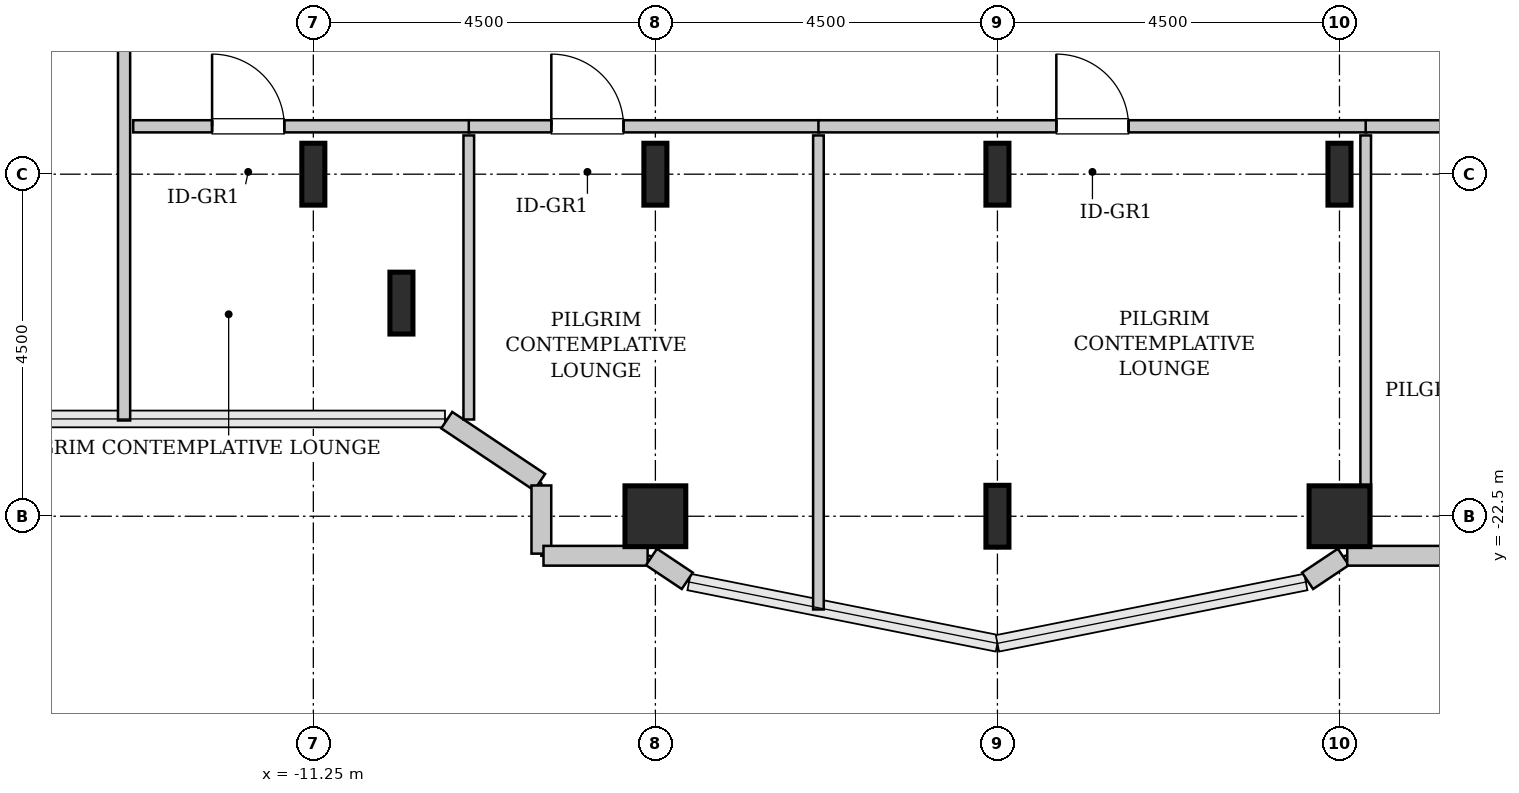
"""IFC4 building model, lengths in metres.
Left out: names, types, materials, properties, quantities, classifications, styles, units other than length and angle.
Written with IfcOpenShell. Run it as: python <this file> out.ifc"""

import sys

from ifc_helpers import new_model, si_unit, direction, frame, frame_2d, origin, origin_2d, place, context, subcontext, project, spatial, rectangle, hollow_rectangle, i_section, extrude, source, transform, mapped, element, fill, save


model = new_model("IFC4")
c1 = context("Model", 3, precision=1e-05, world=origin(), true_north=direction((0.0, 1.0)))
c2 = subcontext(c1, "Body", "Model", "MODEL_VIEW")
j1 = project(units=[si_unit("LENGTHUNIT", "METRE"), si_unit("PLANEANGLEUNIT", "RADIAN")], contexts=[c1])
p1 = place(None, origin())
s1 = spatial("IfcSite", under=j1, at=p1, CompositionType="ELEMENT")
p2 = place(p1, origin())
s2 = spatial("IfcBuilding", under=s1, at=p2, CompositionType="ELEMENT")
p3 = place(p2, frame((0.0, 0.0, 152.6)))
s3 = spatial("IfcBuildingStorey", under=s2, at=p3, CompositionType="ELEMENT", Elevation=152.6)
m1 = source(origin(), c2, "Body", "SweptSolid", [
    extrude(i_section(OverallWidth=0.303, OverallDepth=0.814, WebThickness=0.021, FlangeThickness=0.04, FilletRadius=0.03, at=origin_2d()), origin(), (0.0, 0.0, 1.0), 3.8),
])
for number, where, z_axis, x_axis in (
    (1, (-11.25, -18.0, 0.0), (0.0, 0.0, 1.0), (1.0, 0.0, 0.0)),
    (2, (-10.091, -19.696, 0.0), (0.0, 0.0, 1.0), (1.0, 0.0, 0.0)),
):
    element("IfcColumn", number, at=place(p3, frame(where, z_axis=z_axis, x_axis=x_axis)), inside=s3, PredefinedType="COLUMN", context=c2, shape_type="MappedRepresentation", body=[
        mapped(m1, transform((0.0, 0.0, 0.0), x_axis=(1.0, 0.0, 0.0), y_axis=(0.0, 1.0, 0.0), z_axis=(0.0, 0.0, 1.0), scale=1.0)),
    ])
m2 = source(origin(), c2, "Body", "SweptSolid", [
    extrude(hollow_rectangle(XDim=0.8, YDim=0.8, WallThickness=0.04, InnerFilletRadius=0.04, OuterFilletRadius=0.08, at=origin_2d()), origin(), (0.0, 0.0, 1.0), 3.8),
])
p4 = place(p3, frame((-6.75, -22.5, 0.0), z_axis=(0.0, 0.0, 1.0), x_axis=(1.0, 0.0, 0.0)))
e3 = element("IfcColumn", 3, at=p4, inside=s3, PredefinedType="COLUMN", context=c2, shape_type="MappedRepresentation", body=[
    mapped(m2, transform((0.0, 0.0, 0.0), x_axis=(1.0, 0.0, 0.0), y_axis=(0.0, 1.0, 0.0), z_axis=(0.0, 0.0, 1.0), scale=1.0)),
])
for number, where, z_axis, x_axis in (
    (4, (-6.75, -18.0, 0.0), (0.0, 0.0, 1.0), (1.0, 0.0, 0.0)),
    (5, (-2.25, -22.5, 0.0), (0.0, 0.0, 1.0), (1.0, 0.0, 0.0)),
    (6, (-2.25, -18.0, 0.0), (0.0, 0.0, 1.0), (1.0, 0.0, 0.0)),
):
    element("IfcColumn", number, at=place(p3, frame(where, z_axis=z_axis, x_axis=x_axis)), inside=s3, PredefinedType="COLUMN", context=c2, shape_type="MappedRepresentation", body=[
        mapped(m1, transform((0.0, 0.0, 0.0), x_axis=(1.0, 0.0, 0.0), y_axis=(0.0, 1.0, 0.0), z_axis=(0.0, 0.0, 1.0), scale=1.0)),
    ])
p5 = place(p3, frame((2.25, -22.5, 0.0), z_axis=(0.0, 0.0, 1.0), x_axis=(1.0, 0.0, 0.0)))
e7 = element("IfcColumn", 7, at=p5, inside=s3, PredefinedType="COLUMN", context=c2, shape_type="MappedRepresentation", body=[
    mapped(m2, transform((0.0, 0.0, 0.0), x_axis=(1.0, 0.0, 0.0), y_axis=(0.0, 1.0, 0.0), z_axis=(0.0, 0.0, 1.0), scale=1.0)),
])
p6 = place(p3, frame((2.25, -18.0, 0.0), z_axis=(0.0, 0.0, 1.0), x_axis=(1.0, 0.0, 0.0)))
e8 = element("IfcColumn", 8, at=p6, inside=s3, PredefinedType="COLUMN", context=c2, shape_type="MappedRepresentation", body=[
    mapped(m1, transform((0.0, 0.0, 0.0), x_axis=(1.0, 0.0, 0.0), y_axis=(0.0, 1.0, 0.0), z_axis=(0.0, 0.0, 1.0), scale=1.0)),
])
m3 = source(origin(), c2, "Body", "SweptSolid", [
    extrude(rectangle(XDim=1.469, YDim=0.26, at=frame_2d((0.734, 0.0))), origin(), (0.0, 0.0, 1.0), 3.55),
])
p7 = place(p3, frame((-9.495, -21.236, 0.0), z_axis=(0.0, 0.0, 1.0), x_axis=(0.831461760506, -0.555581983884, 0.0)))
e9 = element("IfcWall", 9, at=p7, inside=s3, PredefinedType="SOLIDWALL", context=c2, shape_type="MappedRepresentation", body=[
    mapped(m3, transform((0.0, 0.0, 0.0), x_axis=(1.0, 0.0, 0.0), y_axis=(0.0, 1.0, 0.0), z_axis=(0.0, 0.0, 1.0), scale=1.0)),
])
m4 = source(origin(), c2, "Body", "SweptSolid", [
    extrude(rectangle(XDim=0.897, YDim=0.26, at=frame_2d((0.448, 0.0))), origin(), (0.0, 0.0, 1.0), 3.55),
])
p8 = place(p3, frame((-8.25, -22.095, 0.0), z_axis=(0.0, 0.0, 1.0), x_axis=(0.0, -1.0, 0.0)))
e10 = element("IfcWall", 10, at=p8, inside=s3, PredefinedType="SOLIDWALL", context=c2, shape_type="MappedRepresentation", body=[
    mapped(m4, transform((0.0, 0.0, 0.0), x_axis=(1.0, 0.0, 0.0), y_axis=(0.0, 1.0, 0.0), z_axis=(0.0, 0.0, 1.0), scale=1.0)),
])
m5 = source(origin(), c2, "Body", "SweptSolid", [
    extrude(rectangle(XDim=1.37, YDim=0.26, at=frame_2d((0.685, 0.0))), origin(), (0.0, 0.0, 1.0), 3.55),
])
p9 = place(p3, frame((-8.222, -23.02, 0.0), z_axis=(0.0, 0.0, 1.0), x_axis=(1.0, 0.0, 0.0)))
e11 = element("IfcWall", 11, at=p9, inside=s3, PredefinedType="SOLIDWALL", context=c2, shape_type="MappedRepresentation", body=[
    mapped(m5, transform((0.0, 0.0, 0.0), x_axis=(1.0, 0.0, 0.0), y_axis=(0.0, 1.0, 0.0), z_axis=(0.0, 0.0, 1.0), scale=1.0)),
])
m6 = source(origin(), c2, "Body", "SweptSolid", [
    extrude(rectangle(XDim=0.565, YDim=0.26, at=frame_2d((0.283, 0.0))), origin(), (0.0, 0.0, 1.0), 3.55),
])
for number, where, z_axis, x_axis in (
    (12, (-6.801, -23.036, 0.0), (0.0, 0.0, 1.0), (0.832, -0.555, 0.0)),
    (13, (1.831, -23.35, 0.0), (0.0, 0.0, 1.0), (0.832, 0.555, 0.0)),
):
    element("IfcWall", number, at=place(p3, frame(where, z_axis=z_axis, x_axis=x_axis)), inside=s3, PredefinedType="SOLIDWALL", context=c2, shape_type="MappedRepresentation", body=[
        mapped(m6, transform((0.0, 0.0, 0.0), x_axis=(1.0, 0.0, 0.0), y_axis=(0.0, 1.0, 0.0), z_axis=(0.0, 0.0, 1.0), scale=1.0)),
    ])
p10 = place(p3, frame((2.352, -23.02, 0.0), z_axis=(0.0, 0.0, 1.0), x_axis=(1.0, 0.0, 0.0)))
e14 = element("IfcWall", 14, at=p10, inside=s3, PredefinedType="SOLIDWALL", context=c2, shape_type="MappedRepresentation", body=[
    mapped(m5, transform((0.0, 0.0, 0.0), x_axis=(1.0, 0.0, 0.0), y_axis=(0.0, 1.0, 0.0), z_axis=(0.0, 0.0, 1.0), scale=1.0)),
])
m7 = source(origin(), c2, "Body", "SweptSolid", [
    extrude(rectangle(XDim=13.045, YDim=0.16, at=frame_2d((6.522, 0.0))), origin(), (0.0, 0.0, 1.0), 3.535),
])
p11 = place(p3, frame((-13.74, -21.24, 0.0), z_axis=(0.0, 0.0, 1.0), x_axis=(0.0, 1.0, 0.0)))
e15 = element("IfcWall", 15, at=p11, inside=s3, PredefinedType="PARTITIONING", context=c2, shape_type="MappedRepresentation", body=[
    mapped(m7, transform((0.0, 0.0, 0.0), x_axis=(1.0, 0.0, 0.0), y_axis=(0.0, 1.0, 0.0), z_axis=(0.0, 0.0, 1.0), scale=1.0)),
])
p12 = place(p11, frame((7.962, 0.0, 0.0)))
e16 = element("IfcOpeningElement", 16, at=p12, cuts=e15, PredefinedType="OPENING", context=c2, shape_type="SweptSolid", body=[
    extrude(rectangle(XDim=0.95, YDim=2.1, at=frame_2d((0.475, 1.05))), frame((0.0, 0.09, 0.0), z_axis=(0.0, -1.0, 0.0), x_axis=(1.0, 0.0, 0.0)), (0.0, 0.0, 1.0), 0.18),
])
m8 = source(origin(), c2, "Body", "SweptSolid", [
    extrude(rectangle(XDim=4.425, YDim=0.16, at=frame_2d((2.212, 0.0))), origin(), (0.0, 0.0, 1.0), 3.535),
])
p13 = place(p3, frame((-13.62, -17.37, 0.0), z_axis=(0.0, 0.0, 1.0), x_axis=(1.0, 0.0, 0.0)))
e17 = element("IfcWall", 17, at=p13, inside=s3, PredefinedType="PARTITIONING", context=c2, shape_type="MappedRepresentation", body=[
    mapped(m8, transform((0.0, 0.0, 0.0), x_axis=(1.0, 0.0, 0.0), y_axis=(0.0, 1.0, 0.0), z_axis=(0.0, 0.0, 1.0), scale=1.0)),
])
p14 = place(p13, frame((1.038, 0.0, 0.0)))
e18 = element("IfcOpeningElement", 18, at=p14, cuts=e17, PredefinedType="OPENING", context=c2, shape_type="SweptSolid", body=[
    extrude(rectangle(XDim=0.95, YDim=2.1, at=frame_2d((0.475, 1.05))), frame((0.0, 0.09, 0.0), z_axis=(0.0, -1.0, 0.0), x_axis=(1.0, 0.0, 0.0)), (0.0, 0.0, 1.0), 0.18),
])
m9 = source(origin(), c2, "Body", "SweptSolid", [
    extrude(rectangle(XDim=3.737, YDim=0.14, at=frame_2d((1.869, 0.0))), origin(), (0.0, 0.0, 1.0), 3.535),
])
p15 = place(p3, frame((-9.205, -21.227, 0.0), z_axis=(0.0, 0.0, 1.0), x_axis=(0.0, 1.0, 0.0)))
e19 = element("IfcWall", 19, at=p15, inside=s3, PredefinedType="PARTITIONING", context=c2, shape_type="MappedRepresentation", body=[
    mapped(m9, transform((0.0, 0.0, 0.0), x_axis=(1.0, 0.0, 0.0), y_axis=(0.0, 1.0, 0.0), z_axis=(0.0, 0.0, 1.0), scale=1.0)),
])
m10 = source(origin(), c2, "Body", "SweptSolid", [
    extrude(rectangle(XDim=4.61, YDim=0.16, at=frame_2d((2.305, 0.0))), origin(), (0.0, 0.0, 1.0), 3.535),
])
p16 = place(p3, frame((-9.205, -17.37, 0.0), z_axis=(0.0, 0.0, 1.0), x_axis=(1.0, 0.0, 0.0)))
e20 = element("IfcWall", 20, at=p16, inside=s3, PredefinedType="PARTITIONING", context=c2, shape_type="MappedRepresentation", body=[
    mapped(m10, transform((0.0, 0.0, 0.0), x_axis=(1.0, 0.0, 0.0), y_axis=(0.0, 1.0, 0.0), z_axis=(0.0, 0.0, 1.0), scale=1.0)),
])
p17 = place(p16, frame((1.086, 0.0, 0.0)))
e21 = element("IfcOpeningElement", 21, at=p17, cuts=e20, PredefinedType="OPENING", context=c2, shape_type="SweptSolid", body=[
    extrude(rectangle(XDim=0.95, YDim=2.1, at=frame_2d((0.475, 1.05))), frame((0.0, 0.09, 0.0), z_axis=(0.0, -1.0, 0.0), x_axis=(1.0, 0.0, 0.0)), (0.0, 0.0, 1.0), 0.18),
])
m11 = source(origin(), c2, "Body", "SweptSolid", [
    extrude(rectangle(XDim=6.236, YDim=0.14, at=frame_2d((3.118, 0.0))), origin(), (0.0, 0.0, 1.0), 3.535),
])
p18 = place(p3, frame((-4.605, -23.726, 0.0), z_axis=(0.0, 0.0, 1.0), x_axis=(0.0, 1.0, 0.0)))
e22 = element("IfcWall", 22, at=p18, inside=s3, PredefinedType="PARTITIONING", context=c2, shape_type="MappedRepresentation", body=[
    mapped(m11, transform((0.0, 0.0, 0.0), x_axis=(1.0, 0.0, 0.0), y_axis=(0.0, 1.0, 0.0), z_axis=(0.0, 0.0, 1.0), scale=1.0)),
])
m12 = source(origin(), c2, "Body", "SweptSolid", [
    extrude(rectangle(XDim=7.21, YDim=0.16, at=frame_2d((3.605, 0.0))), origin(), (0.0, 0.0, 1.0), 3.535),
])
p19 = place(p3, frame((-4.605, -17.37, 0.0), z_axis=(0.0, 0.0, 1.0), x_axis=(1.0, 0.0, 0.0)))
e23 = element("IfcWall", 23, at=p19, inside=s3, PredefinedType="PARTITIONING", context=c2, shape_type="MappedRepresentation", body=[
    mapped(m12, transform((0.0, 0.0, 0.0), x_axis=(1.0, 0.0, 0.0), y_axis=(0.0, 1.0, 0.0), z_axis=(0.0, 0.0, 1.0), scale=1.0)),
])
p20 = place(p19, frame((3.13, 0.0, 0.0)))
e24 = element("IfcOpeningElement", 24, at=p20, cuts=e23, PredefinedType="OPENING", context=c2, shape_type="SweptSolid", body=[
    extrude(rectangle(XDim=0.95, YDim=2.1, at=frame_2d((0.475, 1.05))), frame((0.0, 0.09, 0.0), z_axis=(0.0, -1.0, 0.0), x_axis=(1.0, 0.0, 0.0)), (0.0, 0.0, 1.0), 0.18),
])
m13 = source(origin(), c2, "Body", "SweptSolid", [
    extrude(rectangle(XDim=5.36, YDim=0.14, at=frame_2d((2.68, 0.0))), origin(), (0.0, 0.0, 1.0), 2.875),
])
p21 = place(p3, frame((2.595, -22.85, 0.0), z_axis=(0.0, 0.0, 1.0), x_axis=(0.0, 1.0, 0.0)))
e25 = element("IfcWall", 25, at=p21, inside=s3, PredefinedType="PARTITIONING", context=c2, shape_type="MappedRepresentation", body=[
    mapped(m13, transform((0.0, 0.0, 0.0), x_axis=(1.0, 0.0, 0.0), y_axis=(0.0, 1.0, 0.0), z_axis=(0.0, 0.0, 1.0), scale=1.0)),
])
m14 = source(origin(), c2, "Body", "SweptSolid", [
    extrude(rectangle(XDim=5.81, YDim=0.16, at=frame_2d((2.905, 0.0))), origin(), (0.0, 0.0, 1.0), 3.535),
])
p22 = place(p3, frame((2.595, -17.37, 0.0), z_axis=(0.0, 0.0, 1.0), x_axis=(1.0, 0.0, 0.0)))
e26 = element("IfcWall", 26, at=p22, inside=s3, PredefinedType="PARTITIONING", context=c2, shape_type="MappedRepresentation", body=[
    mapped(m14, transform((0.0, 0.0, 0.0), x_axis=(1.0, 0.0, 0.0), y_axis=(0.0, 1.0, 0.0), z_axis=(0.0, 0.0, 1.0), scale=1.0)),
])
p23 = place(p22, frame((2.43, 0.0, 0.0)))
e27 = element("IfcOpeningElement", 27, at=p23, cuts=e26, PredefinedType="OPENING", context=c2, shape_type="SweptSolid", body=[
    extrude(rectangle(XDim=0.95, YDim=2.1, at=frame_2d((0.475, 1.05))), frame((0.0, 0.09, 0.0), z_axis=(0.0, -1.0, 0.0), x_axis=(1.0, 0.0, 0.0)), (0.0, 0.0, 1.0), 0.18),
])
m15 = source(origin(), c2, "Body", "SweptSolid", [
    extrude(rectangle(XDim=0.95, YDim=2.1, at=frame_2d((0.475, 1.05))), frame((0.0, 0.025, 0.0), z_axis=(0.0, -1.0, 0.0), x_axis=(1.0, 0.0, 0.0)), (0.0, 0.0, 1.0), 0.05),
])
p24 = place(p14, origin())
e28 = element("IfcDoor", 28, at=p24, inside=s3, OperationType="SINGLE_SWING_LEFT", PredefinedType="DOOR", context=c2, shape_type="MappedRepresentation", body=[
    mapped(m15, transform((0.0, 0.0, 0.0), x_axis=(1.0, 0.0, 0.0), y_axis=(0.0, 1.0, 0.0), z_axis=(0.0, 0.0, 1.0), scale=1.0)),
])
fill(e18, e28)
p25 = place(p17, origin())
e29 = element("IfcDoor", 29, at=p25, inside=s3, OperationType="SINGLE_SWING_LEFT", PredefinedType="DOOR", context=c2, shape_type="MappedRepresentation", body=[
    mapped(m15, transform((0.0, 0.0, 0.0), x_axis=(1.0, 0.0, 0.0), y_axis=(0.0, 1.0, 0.0), z_axis=(0.0, 0.0, 1.0), scale=1.0)),
])
fill(e21, e29)
p26 = place(p20, origin())
e30 = element("IfcDoor", 30, at=p26, inside=s3, OperationType="SINGLE_SWING_LEFT", PredefinedType="DOOR", context=c2, shape_type="MappedRepresentation", body=[
    mapped(m15, transform((0.0, 0.0, 0.0), x_axis=(1.0, 0.0, 0.0), y_axis=(0.0, 1.0, 0.0), z_axis=(0.0, 0.0, 1.0), scale=1.0)),
])
fill(e24, e30)
save(model, sys.argv[1])
